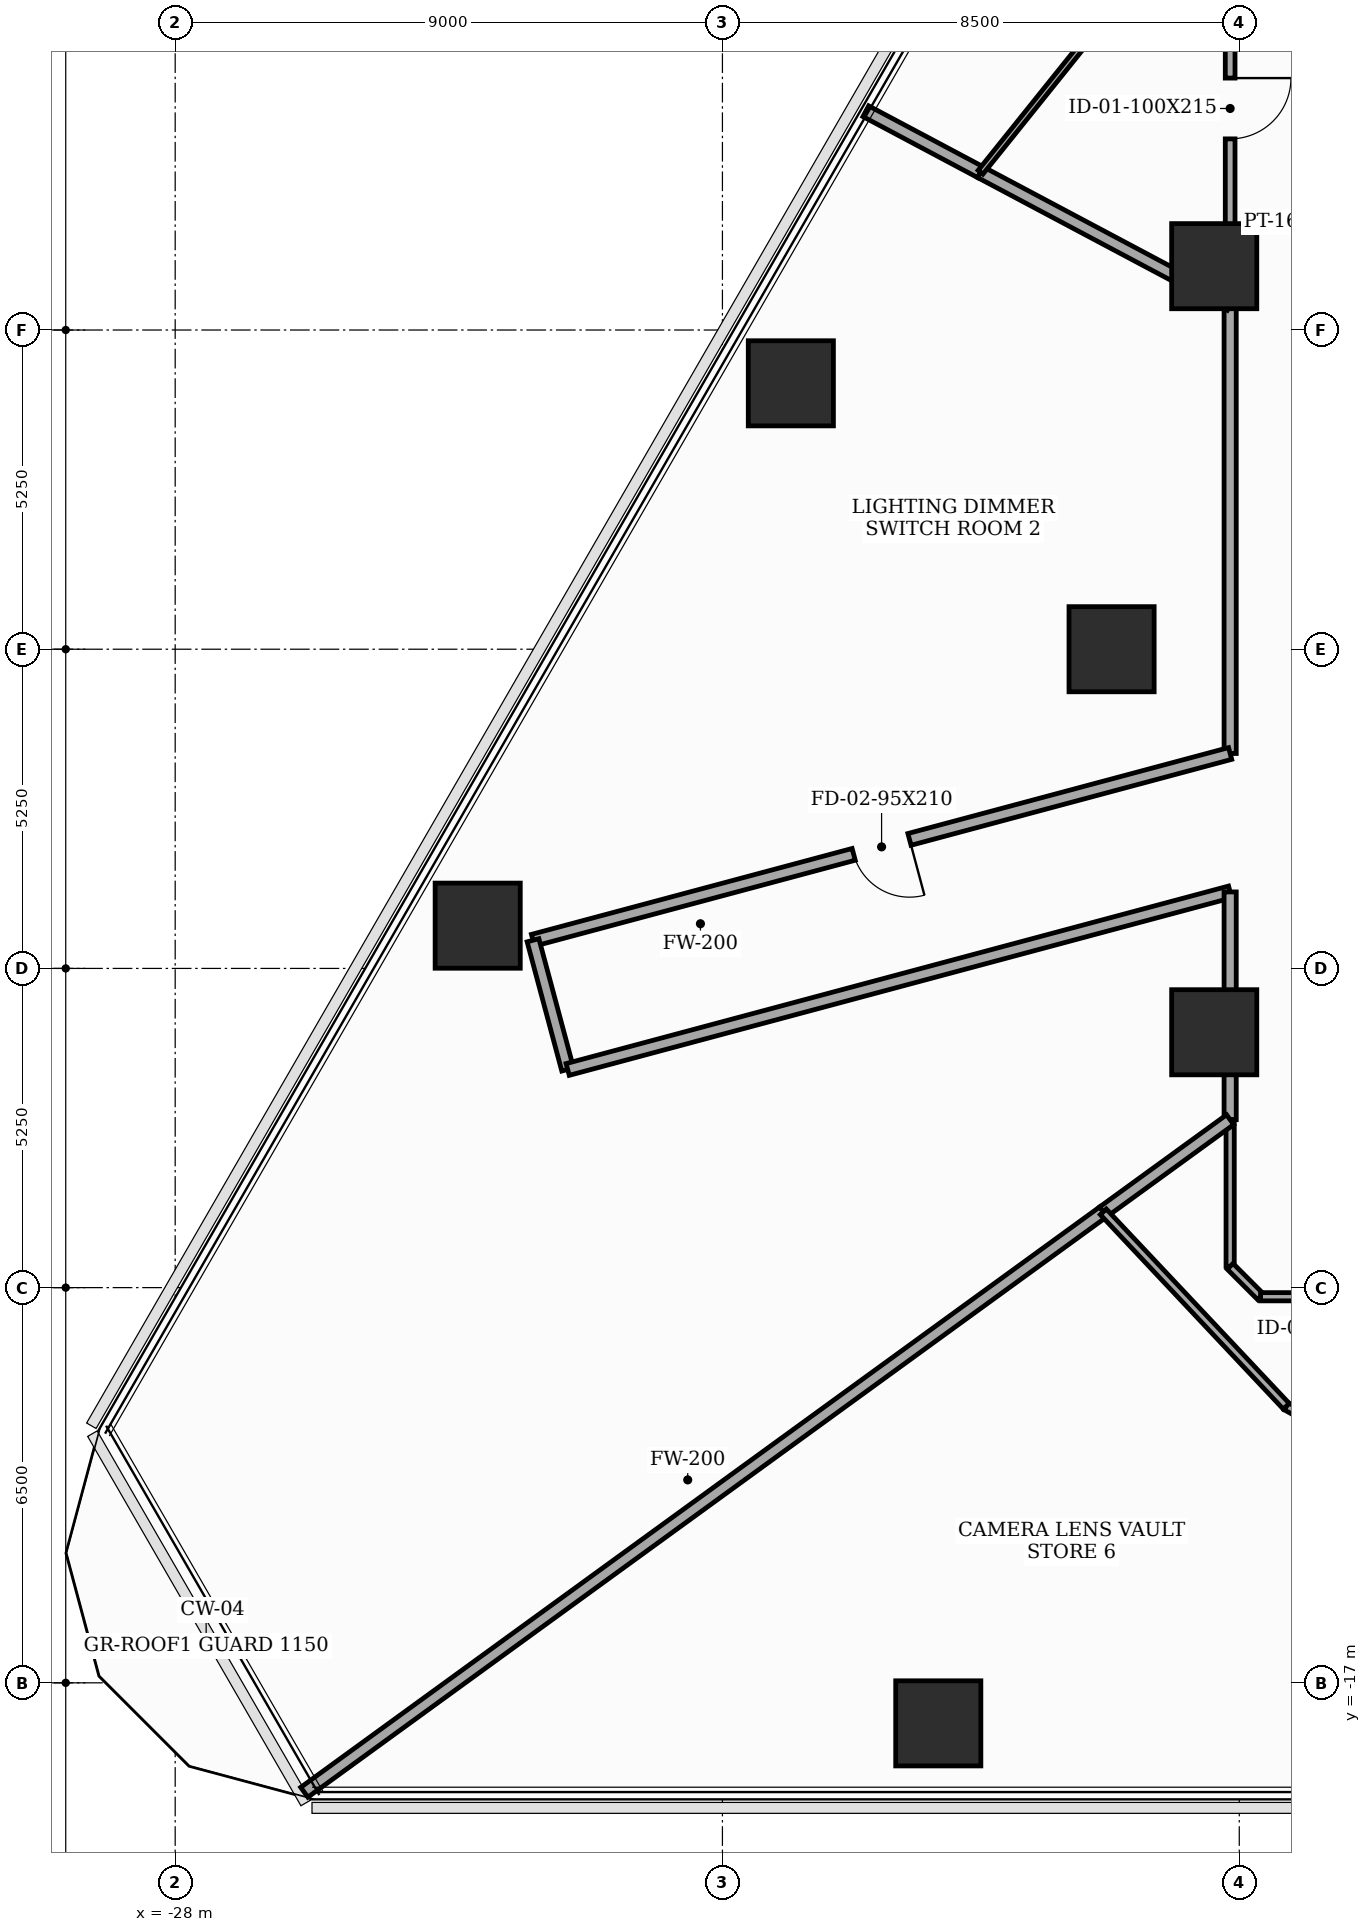
"""IFC4 building model, lengths in metres.
Left out: names, types, materials, properties, quantities, classifications, styles, units other than length and angle.
Written with IfcOpenShell. Run it as: python <this file> out.ifc"""

import sys

from ifc_helpers import new_model, si_unit, direction, frame, frame_2d, origin, origin_2d, place, context, subcontext, project, spatial, rectangle, extrude, element, fill, save


model = new_model("IFC4")
c1 = context("Model", 3, precision=1e-05, world=origin(), true_north=direction((0.0, 1.0)))
c2 = subcontext(c1, "Body", "Model", "MODEL_VIEW")
j1 = project(units=[si_unit("LENGTHUNIT", "METRE"), si_unit("PLANEANGLEUNIT", "RADIAN")], contexts=[c1])
p1 = place(None, origin())
s1 = spatial("IfcSite", under=j1, at=p1, CompositionType="ELEMENT")
p2 = place(p1, origin())
s2 = spatial("IfcBuilding", under=s1, at=p2, CompositionType="ELEMENT")
p3 = place(p2, frame((0.0, 0.0, 37.1)))
s3 = spatial("IfcBuildingStorey", under=s2, at=p3, CompositionType="ELEMENT", Elevation=37.1)
for number, where, z_axis, x_axis in (
    (1, (-10.912, 6.3, 0.0), (0.0, 0.0, 1.0), (1.0, 0.0, 0.0)),
    (2, (-12.6, 0.0, 0.0), (0.0, 0.0, 1.0), (1.0, 0.0, 0.0)),
    (3, (-10.912, -6.3, 0.0), (0.0, 0.0, 1.0), (1.0, 0.0, 0.0)),
    (4, (-15.45, -17.667, 0.0), (0.0, 0.0, 1.0), (1.0, 0.0, 0.0)),
    (5, (-17.875, 4.373, 0.0), (0.0, 0.0, 1.0), (1.0, 0.0, 0.0)),
    (6, (-23.025, -4.547, 0.0), (0.0, 0.0, 1.0), (1.0, 0.0, 0.0)),
):
    element("IfcColumn", number, at=place(p3, frame(where, z_axis=z_axis, x_axis=x_axis)), inside=s3, PredefinedType="COLUMN", context=c2, shape_type="SweptSolid", body=[
        extrude(rectangle(XDim=1.4, YDim=1.4, at=origin_2d()), origin(), (0.0, 0.0, 1.0), 3.7),
    ])
p4 = place(p3, frame((-10.65, 5.663, 0.0), z_axis=(0.0, 0.0, 1.0), x_axis=(0.0, -1.0, 0.0)))
e7 = element("IfcWall", 7, at=p4, inside=s3, PredefinedType="SOLIDWALL", context=c2, shape_type="SweptSolid", body=[
    extrude(rectangle(XDim=7.378, YDim=0.2, at=frame_2d((3.689, 0.0))), origin(), (0.0, 0.0, 1.0), 2.785),
])
p5 = place(p3, frame((-10.65, -1.715, 0.0), z_axis=(0.0, 0.0, 1.0), x_axis=(-0.965926659449, -0.258815935688, 0.0)))
e8 = element("IfcWall", 8, at=p5, inside=s3, PredefinedType="SOLIDWALL", context=c2, shape_type="SweptSolid", body=[
    extrude(rectangle(XDim=11.87, YDim=0.2, at=frame_2d((5.935, 0.0))), origin(), (0.0, 0.0, 1.0), 2.785),
])
p6 = place(p5, frame((5.46, 0.0, 0.0)))
e9 = element("IfcOpeningElement", 9, at=p6, cuts=e8, PredefinedType="OPENING", context=c2, shape_type="SweptSolid", body=[
    extrude(rectangle(XDim=0.95, YDim=2.1, at=frame_2d((0.475, 1.05))), frame((0.0, 0.11, 0.0), z_axis=(0.0, -1.0, 0.0), x_axis=(1.0, 0.0, 0.0)), (0.0, 0.0, 1.0), 0.22),
])
p7 = place(p3, frame((-22.115, -4.787, 0.0), z_axis=(0.0, 0.0, 1.0), x_axis=(0.259105843213, -0.965848933329, 0.0)))
e10 = element("IfcWall", 10, at=p7, inside=s3, PredefinedType="SOLIDWALL", context=c2, shape_type="SweptSolid", body=[
    extrude(rectangle(XDim=2.2, YDim=0.2, at=frame_2d((1.1, 0.0))), origin(), (0.0, 0.0, 1.0), 2.935),
])
p8 = place(p3, frame((-21.545, -6.912, 0.0), z_axis=(0.0, 0.0, 1.0), x_axis=(0.965906888357, 0.258889712088, 0.0)))
e11 = element("IfcWall", 11, at=p8, inside=s3, PredefinedType="SOLIDWALL", context=c2, shape_type="SweptSolid", body=[
    extrude(rectangle(XDim=11.28, YDim=0.2, at=frame_2d((5.64, 0.0))), origin(), (0.0, 0.0, 1.0), 2.785),
])
p9 = place(p3, frame((-10.65, -3.992, 0.0), z_axis=(0.0, 0.0, 1.0), x_axis=(0.0, -1.0, 0.0)))
e12 = element("IfcWall", 12, at=p9, inside=s3, PredefinedType="SOLIDWALL", context=c2, shape_type="SweptSolid", body=[
    extrude(rectangle(XDim=3.746, YDim=0.2, at=frame_2d((1.873, 0.0))), origin(), (0.0, 0.0, 1.0), 2.785),
])
p10 = place(p3, frame((-10.65, -7.738, 0.0), z_axis=(0.0, 0.0, 1.0), x_axis=(0.0, -1.0, 0.0)))
e13 = element("IfcWall", 13, at=p10, inside=s3, PredefinedType="PARTITIONING", context=c2, shape_type="SweptSolid", body=[
    extrude(rectangle(XDim=2.412, YDim=0.135, at=frame_2d((1.206, 0.0))), origin(), (0.0, 0.0, 1.0), 3.5),
])
p11 = place(p3, frame((-10.65, -10.15, 0.0), z_axis=(0.0, 0.0, 1.0), x_axis=(0.707106781187, -0.707106781187, 0.0)))
e14 = element("IfcWall", 14, at=p11, inside=s3, PredefinedType="PARTITIONING", context=c2, shape_type="SweptSolid", body=[
    extrude(rectangle(XDim=0.707, YDim=0.135, at=frame_2d((0.354, 0.0))), origin(), (0.0, 0.0, 1.0), 3.5),
])
p12 = place(p3, frame((-10.15, -10.65, 0.0), z_axis=(0.0, 0.0, 1.0), x_axis=(1.0, 0.0, 0.0)))
e15 = element("IfcWall", 15, at=p12, inside=s3, PredefinedType="PARTITIONING", context=c2, shape_type="SweptSolid", body=[
    extrude(rectangle(XDim=5.3, YDim=0.135, at=frame_2d((2.65, 0.0))), origin(), (0.0, 0.0, 1.0), 2.785),
])
p13 = place(p12, frame((0.585, 0.0, 0.0)))
e16 = element("IfcOpeningElement", 16, at=p13, cuts=e15, PredefinedType="OPENING", context=c2, shape_type="SweptSolid", body=[
    extrude(rectangle(XDim=0.95, YDim=2.1, at=frame_2d((0.475, 1.05))), frame((0.0, 0.077, 0.0), z_axis=(0.0, -1.0, 0.0), x_axis=(1.0, 0.0, 0.0)), (0.0, 0.0, 1.0), 0.155),
])
p14 = place(p3, frame((-10.65, 10.15, 0.0), z_axis=(0.0, 0.0, 1.0), x_axis=(0.0, -1.0, 0.0)))
e17 = element("IfcWall", 17, at=p14, inside=s3, PredefinedType="PARTITIONING", context=c2, shape_type="SweptSolid", body=[
    extrude(rectangle(XDim=4.487, YDim=0.16, at=frame_2d((2.243, 0.0))), origin(), (0.0, 0.0, 1.0), 2.785),
])
p15 = place(p14, frame((0.756, 0.0, 0.0)))
e18 = element("IfcOpeningElement", 18, at=p15, cuts=e17, PredefinedType="OPENING", context=c2, shape_type="SweptSolid", body=[
    extrude(rectangle(XDim=1.0, YDim=2.15, at=frame_2d((0.5, 1.075))), frame((0.0, 0.09, 0.0), z_axis=(0.0, -1.0, 0.0), x_axis=(1.0, 0.0, 0.0)), (0.0, 0.0, 1.0), 0.18),
])
p16 = place(p3, frame((-25.876, -18.8, 0.0), z_axis=(0.0, 0.0, 1.0), x_axis=(0.809014839236, 0.587788218575, 0.0)))
e19 = element("IfcWall", 19, at=p16, inside=s3, PredefinedType="SOLIDWALL", context=c2, shape_type="SweptSolid", body=[
    extrude(rectangle(XDim=16.242, YDim=0.2, at=frame_2d((8.121, 0.0))), origin(), (0.0, 0.0, 1.0), 2.935),
])
p17 = place(p3, frame((-12.736, -9.253, 0.0), z_axis=(0.0, 0.0, 1.0), x_axis=(0.809165833136, 0.587580338749, 0.0)))
e20 = element("IfcWall", 20, at=p17, inside=s3, PredefinedType="SOLIDWALL", context=c2, shape_type="SweptSolid", body=[
    extrude(rectangle(XDim=2.578, YDim=0.2, at=frame_2d((1.289, 0.0))), origin(), (0.0, 0.0, 1.0), 3.5),
])
p18 = place(p3, frame((-14.755, 7.845, 0.0), z_axis=(0.0, 0.0, 1.0), x_axis=(-0.882905636776, 0.469550462197, 0.0)))
e21 = element("IfcWall", 21, at=p18, inside=s3, PredefinedType="SOLIDWALL", context=c2, shape_type="SweptSolid", body=[
    extrude(rectangle(XDim=2.137, YDim=0.2, at=frame_2d((1.069, 0.0))), origin(), (0.0, 0.0, 1.0), 2.935),
])
p19 = place(p3, frame((-10.65, 5.663, 0.0), z_axis=(0.0, 0.0, 1.0), x_axis=(-0.883016425854, 0.46934208385, 0.0)))
e22 = element("IfcWall", 22, at=p19, inside=s3, PredefinedType="SOLIDWALL", context=c2, shape_type="SweptSolid", body=[
    extrude(rectangle(XDim=4.649, YDim=0.2, at=frame_2d((2.324, 0.0))), origin(), (0.0, 0.0, 1.0), 2.785),
])
p20 = place(p3, frame((-5.897, -14.596, 0.0), z_axis=(0.0, 0.0, 1.0), x_axis=(-0.87248894478, 0.488633851915, 0.0)))
e23 = element("IfcWall", 23, at=p20, inside=s3, PredefinedType="PARTITIONING", context=c2, shape_type="SweptSolid", body=[
    extrude(rectangle(XDim=4.39, YDim=0.135, at=frame_2d((2.195, 0.0))), origin(), (0.0, 0.0, 1.0), 2.685),
])
p21 = place(p3, frame((-9.727, -12.451, 0.0), z_axis=(0.0, 0.0, 1.0), x_axis=(-0.685262368975, 0.728296289752, 0.0)))
e24 = element("IfcWall", 24, at=p21, inside=s3, PredefinedType="PARTITIONING", context=c2, shape_type="SweptSolid", body=[
    extrude(rectangle(XDim=4.391, YDim=0.135, at=frame_2d((2.196, 0.0))), origin(), (0.0, 0.0, 1.0), 3.5),
])
p22 = place(p3, frame((-14.755, 7.845, 0.0), z_axis=(0.0, 0.0, 1.0), x_axis=(0.625893000506, 0.779908938222, 0.0)))
e25 = element("IfcWall", 25, at=p22, inside=s3, PredefinedType="MOVABLE", context=c2, shape_type="SweptSolid", body=[
    extrude(rectangle(XDim=6.681, YDim=0.1, at=frame_2d((3.341, 0.0))), origin(), (0.0, 0.0, 1.0), 2.685),
])
p23 = place(p6, origin())
e26 = element("IfcDoor", 26, at=p23, inside=s3, OperationType="SINGLE_SWING_LEFT", PredefinedType="DOOR", context=c2, shape_type="SweptSolid", body=[
    extrude(rectangle(XDim=0.95, YDim=2.1, at=frame_2d((0.475, 1.05))), frame((0.0, 0.025, 0.0), z_axis=(0.0, -1.0, 0.0), x_axis=(1.0, 0.0, 0.0)), (0.0, 0.0, 1.0), 0.05),
])
fill(e9, e26)
p24 = place(p15, origin())
e27 = element("IfcDoor", 27, at=p24, inside=s3, OperationType="SINGLE_SWING_LEFT", PredefinedType="DOOR", context=c2, shape_type="SweptSolid", body=[
    extrude(rectangle(XDim=1.0, YDim=2.15, at=frame_2d((0.5, 1.075))), frame((0.0, 0.025, 0.0), z_axis=(0.0, -1.0, 0.0), x_axis=(1.0, 0.0, 0.0)), (0.0, 0.0, 1.0), 0.05),
])
fill(e18, e27)
save(model, sys.argv[1])
